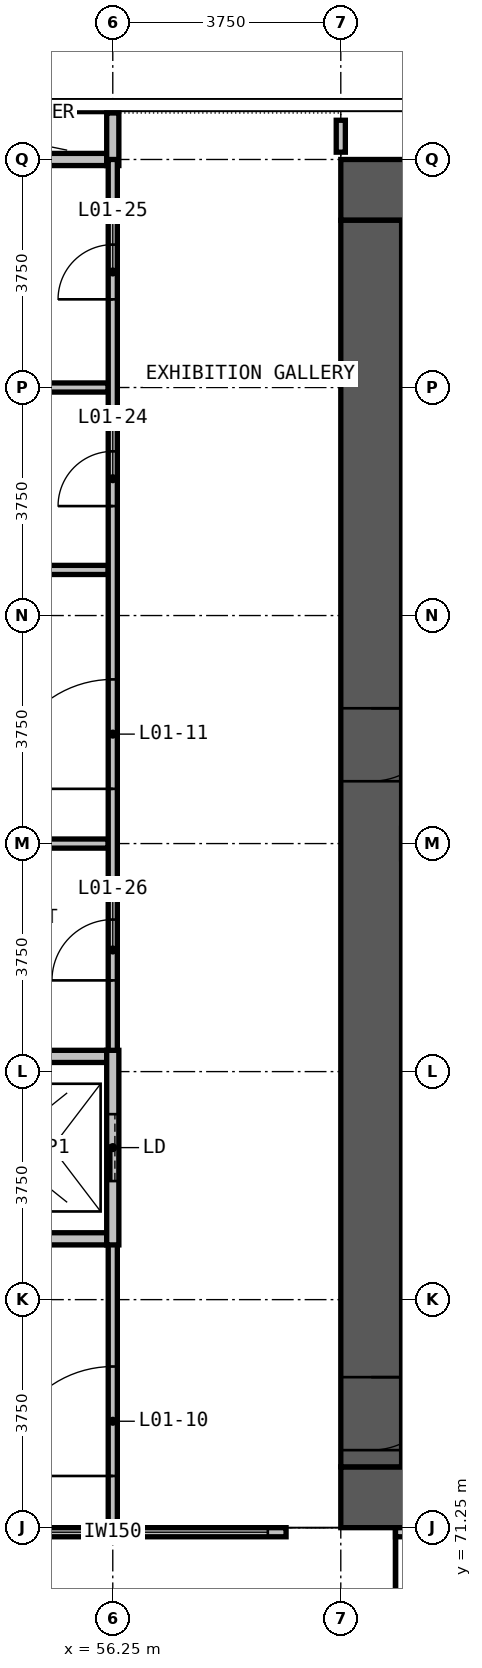
"""IFC4 building model, lengths in metres.
Left out: names, types, materials, properties, quantities, classifications, styles, units other than length and angle.
Written with IfcOpenShell. Run it as: python <this file> out.ifc"""

import sys

from ifc_helpers import new_model, si_unit, direction, frame, frame_2d, origin, place, context, subcontext, project, spatial, polyline, rectangle, outline, extrude, element, fill, save


model = new_model("IFC4")
c1 = context("Model", 3, precision=1e-05, world=origin(), true_north=direction((0.0, 1.0)))
c2 = subcontext(c1, "Body", "Model", "MODEL_VIEW")
j1 = project(units=[si_unit("LENGTHUNIT", "METRE"), si_unit("PLANEANGLEUNIT", "RADIAN")], contexts=[c1])
p1 = place(None, origin())
s1 = spatial("IfcSite", under=j1, at=p1, CompositionType="ELEMENT")
p2 = place(p1, origin())
s2 = spatial("IfcBuilding", under=s1, at=p2, CompositionType="ELEMENT")
p3 = place(p2, frame((0.0, 0.0, 7.5)))
s3 = spatial("IfcBuildingStorey", under=s2, at=p3, CompositionType="ELEMENT", Elevation=7.5)
p4 = place(p3, frame((60.9, 66.562, 0.84), z_axis=(1.0, 0.0, 0.0), x_axis=(0.0, 0.371855891589, -0.928290469568)))
e1 = element("IfcWall", 1, at=p4, inside=s3, PredefinedType="SHEAR", context=c2, shape_type="SweptSolid", body=[
    extrude(outline(polyline([(0.0, 0.0), (0.905, 0.0), (2.523, 4.039), (-5.832, 7.386), (-9.19, -0.996), (-8.194, -0.757), (-6.429, -0.454), (-4.475, -0.227), (-2.332, -0.076), (0.0, 0.0)])), origin(), (0.0, 0.0, -1.0), 1.8),
])
for number, where, z_axis, x_axis in (
    (2, (60.0, 71.75, 0.0), (0.0, 0.0, 1.0), (1.0, 0.0, 0.0)),
    (3, (90.0, 93.25, 0.0), (0.0, 0.0, 1.0), (-1.0, 0.0, 0.0)),
):
    element("IfcWall", number, at=place(p3, frame(where, z_axis=z_axis, x_axis=x_axis)), inside=s3, PredefinedType="SHEAR", context=c2, shape_type="SweptSolid", body=[
        extrude(rectangle(XDim=30.0, YDim=1.0, at=frame_2d((15.0, 0.0))), origin(), (0.0, 0.0, 1.0), 9.0),
    ])
p5 = place(p3, frame((60.5, 92.75, 0.0), z_axis=(0.0, 0.0, 1.0), x_axis=(0.0, -1.0, 0.0)))
e4 = element("IfcWall", 4, at=p5, inside=s3, PredefinedType="SHEAR", context=c2, shape_type="SweptSolid", body=[
    extrude(rectangle(XDim=20.5, YDim=1.0, at=frame_2d((10.25, 0.0))), origin(), (0.0, 0.0, 1.0), 9.0),
])
p6 = place(p5, frame((19.025, 0.0, 0.0)))
e5 = element("IfcOpeningElement", 5, at=p6, cuts=e4, PredefinedType="OPENING", context=c2, shape_type="SweptSolid", body=[
    extrude(rectangle(XDim=1.2, YDim=2.2, at=frame_2d((0.6, 1.1))), frame((0.0, 0.51, 0.0), z_axis=(0.0, -1.0, 0.0), x_axis=(1.0, 0.0, 0.0)), (0.0, 0.0, 1.0), 1.02),
])
p7 = place(p5, frame((8.025, 0.0, 0.0)))
e6 = element("IfcOpeningElement", 6, at=p7, cuts=e4, PredefinedType="OPENING", context=c2, shape_type="SweptSolid", body=[
    extrude(rectangle(XDim=1.2, YDim=2.2, at=frame_2d((0.6, 1.1))), frame((0.0, 0.51, 0.0), z_axis=(0.0, -1.0, 0.0), x_axis=(1.0, 0.0, 0.0)), (0.0, 0.0, 1.0), 1.02),
])
p8 = place(p3, frame((53.4, 71.175, 0.0), z_axis=(0.0, 0.0, 1.0), x_axis=(1.0, 0.0, 0.0)))
e7 = element("IfcWall", 7, at=p8, inside=s3, PredefinedType="SOLIDWALL", context=c2, shape_type="SweptSolid", body=[
    extrude(rectangle(XDim=5.7, YDim=0.15, at=frame_2d((2.85, 0.0))), origin(), (0.0, 0.0, 1.0), 8.65),
])
p9 = place(p8, frame((0.3, 0.0, 0.9)))
e8 = element("IfcOpeningElement", 8, at=p9, cuts=e7, PredefinedType="OPENING", context=c2, shape_type="SweptSolid", body=[
    extrude(rectangle(XDim=2.4, YDim=3.6, at=frame_2d((1.2, 1.8))), frame((0.0, 0.085, 0.0), z_axis=(0.0, -1.0, 0.0), x_axis=(1.0, 0.0, 0.0)), (0.0, 0.0, 1.0), 0.17),
])
p10 = place(p8, frame((3.0, 0.0, 0.9)))
e9 = element("IfcOpeningElement", 9, at=p10, cuts=e7, PredefinedType="OPENING", context=c2, shape_type="SweptSolid", body=[
    extrude(rectangle(XDim=2.4, YDim=3.6, at=frame_2d((1.2, 1.8))), frame((0.0, 0.085, 0.0), z_axis=(0.0, -1.0, 0.0), x_axis=(1.0, 0.0, 0.0)), (0.0, 0.0, 1.0), 0.17),
])
p11 = place(p3, frame((60.9, 71.175, 0.0), z_axis=(0.0, 0.0, 1.0), x_axis=(1.0, 0.0, 0.0)))
e10 = element("IfcWall", 10, at=p11, inside=s3, PredefinedType="SOLIDWALL", context=c2, shape_type="SweptSolid", body=[
    extrude(rectangle(XDim=5.7, YDim=0.15, at=frame_2d((2.85, 0.0))), origin(), (0.0, 0.0, 1.0), 8.65),
])
p12 = place(p3, frame((52.6, 93.75, 0.0), z_axis=(0.0, 0.0, 1.0), x_axis=(1.0, 0.0, 0.0)))
e11 = element("IfcWall", 11, at=p12, inside=s3, PredefinedType="PARTITIONING", context=c2, shape_type="SweptSolid", body=[
    extrude(rectangle(XDim=3.55, YDim=0.2, at=frame_2d((1.775, 0.0))), origin(), (0.0, 0.0, 1.0), 8.65),
])
p13 = place(p3, frame((56.25, 93.65, 0.0), z_axis=(0.0, 0.0, 1.0), x_axis=(0.0, 1.0, 0.0)))
e12 = element("IfcWall", 12, at=p13, inside=s3, PredefinedType="PARTITIONING", context=c2, shape_type="SweptSolid", body=[
    extrude(rectangle(XDim=0.865, YDim=0.2, at=frame_2d((0.433, 0.0))), origin(), (0.0, 0.0, 1.0), 8.65),
])
p14 = place(p3, frame((52.575, 82.5, 0.0), z_axis=(0.0, 0.0, 1.0), x_axis=(1.0, 0.0, 0.0)))
e13 = element("IfcWall", 13, at=p14, inside=s3, PredefinedType="PARTITIONING", context=c2, shape_type="SweptSolid", body=[
    extrude(rectangle(XDim=3.6, YDim=0.15, at=frame_2d((1.8, 0.0))), origin(), (0.0, 0.0, 1.0), 8.65),
])
p15 = place(p3, frame((45.1, 87.0, 0.0), z_axis=(0.0, 0.0, 1.0), x_axis=(1.0, 0.0, 0.0)))
e14 = element("IfcWall", 14, at=p15, inside=s3, PredefinedType="PARTITIONING", context=c2, shape_type="SweptSolid", body=[
    extrude(rectangle(XDim=11.075, YDim=0.15, at=frame_2d((5.538, 0.0))), origin(), (0.0, 0.0, 1.0), 8.65),
])
p16 = place(p15, frame((4.45, 0.0, 0.0)))
e15 = element("IfcOpeningElement", 15, at=p16, cuts=e14, PredefinedType="OPENING", context=c2, shape_type="SweptSolid", body=[
    extrude(rectangle(XDim=1.0, YDim=2.2, at=frame_2d((0.5, 1.1))), frame((0.0, 0.085, 0.0), z_axis=(0.0, -1.0, 0.0), x_axis=(1.0, 0.0, 0.0)), (0.0, 0.0, 1.0), 0.17),
])
p17 = place(p3, frame((52.575, 90.0, 0.0), z_axis=(0.0, 0.0, 1.0), x_axis=(1.0, 0.0, 0.0)))
e16 = element("IfcWall", 16, at=p17, inside=s3, PredefinedType="PARTITIONING", context=c2, shape_type="SweptSolid", body=[
    extrude(rectangle(XDim=3.6, YDim=0.15, at=frame_2d((1.8, 0.0))), origin(), (0.0, 0.0, 1.0), 8.65),
])
p18 = place(p3, frame((56.25, 71.25, 0.0), z_axis=(0.0, 0.0, 1.0), x_axis=(0.0, 1.0, 0.0)))
e17 = element("IfcWall", 17, at=p18, inside=s3, PredefinedType="PARTITIONING", context=c2, shape_type="SweptSolid", body=[
    extrude(rectangle(XDim=4.85, YDim=0.15, at=frame_2d((2.425, 0.0))), origin(), (0.0, 0.0, 1.0), 8.65),
])
p19 = place(p18, frame((0.85, 0.0, 0.0)))
e18 = element("IfcOpeningElement", 18, at=p19, cuts=e17, PredefinedType="OPENING", context=c2, shape_type="SweptSolid", body=[
    extrude(rectangle(XDim=1.8, YDim=2.2, at=frame_2d((0.9, 1.1))), frame((0.0, 0.085, 0.0), z_axis=(0.0, -1.0, 0.0), x_axis=(1.0, 0.0, 0.0)), (0.0, 0.0, 1.0), 0.17),
])
p20 = place(p3, frame((56.25, 78.9, 0.0), z_axis=(0.0, 0.0, 1.0), x_axis=(0.0, 1.0, 0.0)))
e19 = element("IfcWall", 19, at=p20, inside=s3, PredefinedType="PARTITIONING", context=c2, shape_type="SweptSolid", body=[
    extrude(rectangle(XDim=14.85, YDim=0.15, at=frame_2d((7.425, 0.0))), origin(), (0.0, 0.0, 1.0), 8.65),
])
p21 = place(p20, frame((4.5, 0.0, 0.0)))
e20 = element("IfcOpeningElement", 20, at=p21, cuts=e19, PredefinedType="OPENING", context=c2, shape_type="SweptSolid", body=[
    extrude(rectangle(XDim=1.8, YDim=2.2, at=frame_2d((0.9, 1.1))), frame((0.0, 0.085, 0.0), z_axis=(0.0, -1.0, 0.0), x_axis=(1.0, 0.0, 0.0)), (0.0, 0.0, 1.0), 0.17),
])
p22 = place(p20, frame((9.15, 0.0, 0.0)))
e21 = element("IfcOpeningElement", 21, at=p22, cuts=e19, PredefinedType="OPENING", context=c2, shape_type="SweptSolid", body=[
    extrude(rectangle(XDim=0.9, YDim=2.2, at=frame_2d((0.45, 1.1))), frame((0.0, 0.085, 0.0), z_axis=(0.0, -1.0, 0.0), x_axis=(1.0, 0.0, 0.0)), (0.0, 0.0, 1.0), 0.17),
])
p23 = place(p20, frame((12.55, 0.0, 0.0)))
e22 = element("IfcOpeningElement", 22, at=p23, cuts=e19, PredefinedType="OPENING", context=c2, shape_type="SweptSolid", body=[
    extrude(rectangle(XDim=0.9, YDim=2.2, at=frame_2d((0.45, 1.1))), frame((0.0, 0.085, 0.0), z_axis=(0.0, -1.0, 0.0), x_axis=(1.0, 0.0, 0.0)), (0.0, 0.0, 1.0), 0.17),
])
p24 = place(p20, frame((1.35, 0.0, 0.0)))
e23 = element("IfcOpeningElement", 23, at=p24, cuts=e19, PredefinedType="OPENING", context=c2, shape_type="SweptSolid", body=[
    extrude(rectangle(XDim=1.0, YDim=2.2, at=frame_2d((0.5, 1.1))), frame((0.0, 0.085, 0.0), z_axis=(0.0, -1.0, 0.0), x_axis=(1.0, 0.0, 0.0)), (0.0, 0.0, 1.0), 0.17),
])
p25 = place(p3, frame((60.0, 93.87, 0.0), z_axis=(0.0, 0.0, 1.0), x_axis=(0.0, 1.0, 0.0)))
e24 = element("IfcWall", 24, at=p25, inside=s3, PredefinedType="PARTITIONING", context=c2, shape_type="SweptSolid", body=[
    extrude(rectangle(XDim=0.525, YDim=0.15, at=frame_2d((0.262, 0.0))), origin(), (0.0, 0.0, 1.0), 8.65),
])
for number, where, z_axis, x_axis in (
    (25, (52.6, 76.0, 0.0), (0.0, 0.0, 1.0), (1.0, 0.0, 0.0)),
    (26, (52.6, 79.0, 0.0), (0.0, 0.0, 1.0), (1.0, 0.0, 0.0)),
):
    element("IfcWall", number, at=place(p3, frame(where, z_axis=z_axis, x_axis=x_axis)), inside=s3, PredefinedType="PARTITIONING", context=c2, shape_type="SweptSolid", body=[
        extrude(rectangle(XDim=3.55, YDim=0.2, at=frame_2d((1.775, 0.0))), origin(), (0.0, 0.0, 1.0), 8.65),
    ])
p26 = place(p3, frame((56.25, 75.9, 0.0), z_axis=(0.0, 0.0, 1.0), x_axis=(0.0, 1.0, 0.0)))
e27 = element("IfcWall", 27, at=p26, inside=s3, PredefinedType="PARTITIONING", context=c2, shape_type="SweptSolid", body=[
    extrude(rectangle(XDim=3.2, YDim=0.2, at=frame_2d((1.6, 0.0))), origin(), (0.0, 0.0, 1.0), 8.65),
])
p27 = place(p26, frame((1.05, 0.0, 0.0)))
e28 = element("IfcOpeningElement", 28, at=p27, cuts=e27, PredefinedType="OPENING", context=c2, shape_type="SweptSolid", body=[
    extrude(rectangle(XDim=1.1, YDim=2.2, at=frame_2d((0.55, 1.1))), frame((0.0, 0.11, 0.0), z_axis=(0.0, -1.0, 0.0), x_axis=(1.0, 0.0, 0.0)), (0.0, 0.0, 1.0), 0.22),
])
p28 = place(p9, origin())
e29 = element("IfcWindow", 29, at=p28, inside=s3, PartitioningType="SINGLE_PANEL", PredefinedType="WINDOW", context=c2, shape_type="SweptSolid", body=[
    extrude(rectangle(XDim=2.4, YDim=3.6, at=frame_2d((1.2, 1.8))), frame((0.0, 0.03, 0.0), z_axis=(0.0, -1.0, 0.0), x_axis=(1.0, 0.0, 0.0)), (0.0, 0.0, 1.0), 0.06),
])
fill(e8, e29)
p29 = place(p10, origin())
e30 = element("IfcWindow", 30, at=p29, inside=s3, PartitioningType="SINGLE_PANEL", PredefinedType="WINDOW", context=c2, shape_type="SweptSolid", body=[
    extrude(rectangle(XDim=2.4, YDim=3.6, at=frame_2d((1.2, 1.8))), frame((0.0, 0.03, 0.0), z_axis=(0.0, -1.0, 0.0), x_axis=(1.0, 0.0, 0.0)), (0.0, 0.0, 1.0), 0.06),
])
fill(e9, e30)
p30 = place(p6, origin())
e31 = element("IfcDoor", 31, at=p30, inside=s3, OperationType="SINGLE_SWING_LEFT", PredefinedType="DOOR", context=c2, shape_type="SweptSolid", body=[
    extrude(rectangle(XDim=1.2, YDim=2.2, at=frame_2d((0.6, 1.1))), frame((0.0, 0.025, 0.0), z_axis=(0.0, -1.0, 0.0), x_axis=(1.0, 0.0, 0.0)), (0.0, 0.0, 1.0), 0.05),
])
fill(e5, e31)
p31 = place(p27, origin())
e32 = element("IfcDoor", 32, at=p31, inside=s3, OperationType="DOUBLE_DOOR_SLIDING", PredefinedType="DOOR", context=c2, shape_type="SweptSolid", body=[
    extrude(rectangle(XDim=1.1, YDim=2.2, at=frame_2d((0.55, 1.1))), frame((0.0, 0.025, 0.0), z_axis=(0.0, -1.0, 0.0), x_axis=(1.0, 0.0, 0.0)), (0.0, 0.0, 1.0), 0.05),
])
fill(e28, e32)
p32 = place(p19, origin())
e33 = element("IfcDoor", 33, at=p32, inside=s3, OperationType="DOUBLE_DOOR_SINGLE_SWING", PredefinedType="DOOR", context=c2, shape_type="SweptSolid", body=[
    extrude(rectangle(XDim=1.8, YDim=2.2, at=frame_2d((0.9, 1.1))), frame((0.0, 0.025, 0.0), z_axis=(0.0, -1.0, 0.0), x_axis=(1.0, 0.0, 0.0)), (0.0, 0.0, 1.0), 0.05),
])
fill(e18, e33)
p33 = place(p21, origin())
e34 = element("IfcDoor", 34, at=p33, inside=s3, OperationType="DOUBLE_DOOR_SINGLE_SWING", PredefinedType="DOOR", context=c2, shape_type="SweptSolid", body=[
    extrude(rectangle(XDim=1.8, YDim=2.2, at=frame_2d((0.9, 1.1))), frame((0.0, 0.025, 0.0), z_axis=(0.0, -1.0, 0.0), x_axis=(1.0, 0.0, 0.0)), (0.0, 0.0, 1.0), 0.05),
])
fill(e20, e34)
p34 = place(p7, origin())
e35 = element("IfcDoor", 35, at=p34, inside=s3, OperationType="SINGLE_SWING_LEFT", PredefinedType="DOOR", context=c2, shape_type="SweptSolid", body=[
    extrude(rectangle(XDim=1.2, YDim=2.2, at=frame_2d((0.6, 1.1))), frame((0.0, 0.025, 0.0), z_axis=(0.0, -1.0, 0.0), x_axis=(1.0, 0.0, 0.0)), (0.0, 0.0, 1.0), 0.05),
])
fill(e6, e35)
p35 = place(p22, origin())
e36 = element("IfcDoor", 36, at=p35, inside=s3, OperationType="SINGLE_SWING_LEFT", PredefinedType="DOOR", context=c2, shape_type="SweptSolid", body=[
    extrude(rectangle(XDim=0.9, YDim=2.2, at=frame_2d((0.45, 1.1))), frame((0.0, 0.025, 0.0), z_axis=(0.0, -1.0, 0.0), x_axis=(1.0, 0.0, 0.0)), (0.0, 0.0, 1.0), 0.05),
])
fill(e21, e36)
p36 = place(p23, origin())
e37 = element("IfcDoor", 37, at=p36, inside=s3, OperationType="SINGLE_SWING_RIGHT", PredefinedType="DOOR", context=c2, shape_type="SweptSolid", body=[
    extrude(rectangle(XDim=0.9, YDim=2.2, at=frame_2d((0.45, 1.1))), frame((0.0, 0.025, 0.0), z_axis=(0.0, -1.0, 0.0), x_axis=(1.0, 0.0, 0.0)), (0.0, 0.0, 1.0), 0.05),
])
fill(e22, e37)
p37 = place(p24, origin())
e38 = element("IfcDoor", 38, at=p37, inside=s3, OperationType="SINGLE_SWING_LEFT", PredefinedType="DOOR", context=c2, shape_type="SweptSolid", body=[
    extrude(rectangle(XDim=1.0, YDim=2.2, at=frame_2d((0.5, 1.1))), frame((0.0, 0.025, 0.0), z_axis=(0.0, -1.0, 0.0), x_axis=(1.0, 0.0, 0.0)), (0.0, 0.0, 1.0), 0.05),
])
fill(e23, e38)
save(model, sys.argv[1])
